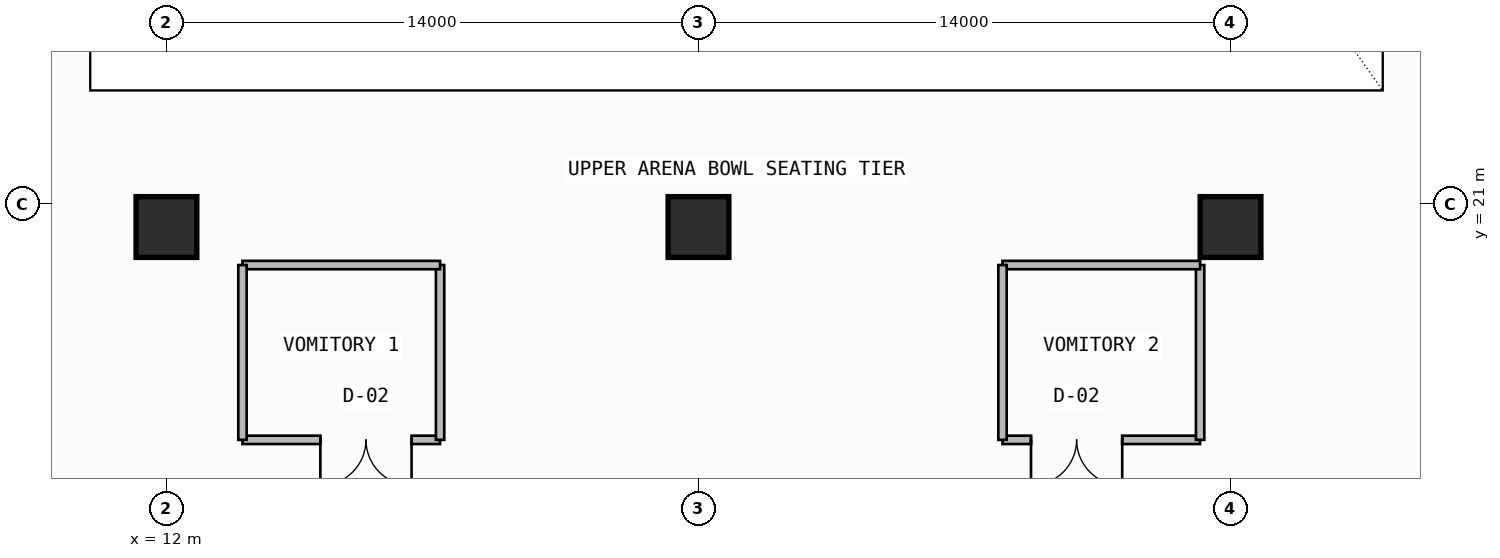
"""IFC4 building model, lengths in metres.
Left out: names, types, materials, properties, quantities, classifications, styles, units other than length and angle.
Written with IfcOpenShell. Run it as: python <this file> out.ifc"""

import sys

from ifc_helpers import new_model, si_unit, direction, frame, frame_2d, origin, origin_2d, place, context, subcontext, project, spatial, rectangle, extrude, element, fill, save


model = new_model("IFC4")
c1 = context("Model", 3, precision=1e-05, world=origin(), true_north=direction((0.0, 1.0)))
c2 = subcontext(c1, "Body", "Model", "MODEL_VIEW")
j1 = project(units=[si_unit("LENGTHUNIT", "METRE"), si_unit("PLANEANGLEUNIT", "RADIAN")], contexts=[c1])
p1 = place(None, origin())
s1 = spatial("IfcSite", under=j1, at=p1, CompositionType="ELEMENT")
p2 = place(p1, origin())
s2 = spatial("IfcBuilding", under=s1, at=p2, CompositionType="ELEMENT")
p3 = place(p2, frame((0.0, 0.0, 13.2)))
s3 = spatial("IfcBuildingStorey", under=s2, at=p3, CompositionType="ELEMENT", Elevation=13.2)
for number, where, z_axis, x_axis in (
    (1, (12.0, 20.4, 0.0), (0.0, 0.0, 1.0), (1.0, 0.0, 0.0)),
    (2, (26.0, 20.4, 0.0), (0.0, 0.0, 1.0), (1.0, 0.0, 0.0)),
    (3, (40.0, 20.4, 0.0), (0.0, 0.0, 1.0), (1.0, 0.0, 0.0)),
):
    element("IfcColumn", number, at=place(p3, frame(where, z_axis=z_axis, x_axis=x_axis)), inside=s3, PredefinedType="COLUMN", context=c2, shape_type="SweptSolid", body=[
        extrude(rectangle(XDim=1.6, YDim=1.6, at=origin_2d()), origin(), (0.0, 0.0, 1.0), 4.2),
    ])
p4 = place(p3, frame((14.0, 14.8, 0.0), z_axis=(0.0, 0.0, 1.0), x_axis=(1.0, 0.0, 0.0)))
e4 = element("IfcWall", 4, at=p4, inside=s3, PredefinedType="SOLIDWALL", context=c2, shape_type="SweptSolid", body=[
    extrude(rectangle(XDim=5.2, YDim=0.22, at=frame_2d((2.6, 0.0))), origin(), (0.0, 0.0, 1.0), 3.365),
])
p5 = place(p4, frame((2.05, 0.0, 0.0)))
e5 = element("IfcOpeningElement", 5, at=p5, cuts=e4, PredefinedType="OPENING", context=c2, shape_type="SweptSolid", body=[
    extrude(rectangle(XDim=2.4, YDim=2.4, at=frame_2d((1.2, 1.2))), frame((0.0, 0.12, 0.0), z_axis=(0.0, -1.0, 0.0), x_axis=(1.0, 0.0, 0.0)), (0.0, 0.0, 1.0), 0.24),
])
p6 = place(p3, frame((19.2, 14.8, 0.0), z_axis=(0.0, 0.0, 1.0), x_axis=(0.0, 1.0, 0.0)))
e6 = element("IfcWall", 6, at=p6, inside=s3, PredefinedType="SOLIDWALL", context=c2, shape_type="SweptSolid", body=[
    extrude(rectangle(XDim=4.6, YDim=0.22, at=frame_2d((2.3, 0.0))), origin(), (0.0, 0.0, 1.0), 3.365),
])
p7 = place(p3, frame((19.2, 19.4, 0.0), z_axis=(0.0, 0.0, 1.0), x_axis=(-1.0, 0.0, 0.0)))
e7 = element("IfcWall", 7, at=p7, inside=s3, PredefinedType="SOLIDWALL", context=c2, shape_type="SweptSolid", body=[
    extrude(rectangle(XDim=5.2, YDim=0.22, at=frame_2d((2.6, 0.0))), origin(), (0.0, 0.0, 1.0), 3.365),
])
p8 = place(p3, frame((14.0, 19.4, 0.0), z_axis=(0.0, 0.0, 1.0), x_axis=(0.0, -1.0, 0.0)))
e8 = element("IfcWall", 8, at=p8, inside=s3, PredefinedType="SOLIDWALL", context=c2, shape_type="SweptSolid", body=[
    extrude(rectangle(XDim=4.6, YDim=0.22, at=frame_2d((2.3, 0.0))), origin(), (0.0, 0.0, 1.0), 3.88),
])
p9 = place(p3, frame((34.0, 14.8, 0.0), z_axis=(0.0, 0.0, 1.0), x_axis=(1.0, 0.0, 0.0)))
e9 = element("IfcWall", 9, at=p9, inside=s3, PredefinedType="SOLIDWALL", context=c2, shape_type="SweptSolid", body=[
    extrude(rectangle(XDim=5.2, YDim=0.22, at=frame_2d((2.6, 0.0))), origin(), (0.0, 0.0, 1.0), 3.88),
])
p10 = place(p9, frame((0.75, 0.0, 0.0)))
e10 = element("IfcOpeningElement", 10, at=p10, cuts=e9, PredefinedType="OPENING", context=c2, shape_type="SweptSolid", body=[
    extrude(rectangle(XDim=2.4, YDim=2.4, at=frame_2d((1.2, 1.2))), frame((0.0, 0.12, 0.0), z_axis=(0.0, -1.0, 0.0), x_axis=(1.0, 0.0, 0.0)), (0.0, 0.0, 1.0), 0.24),
])
p11 = place(p3, frame((39.2, 14.8, 0.0), z_axis=(0.0, 0.0, 1.0), x_axis=(0.0, 1.0, 0.0)))
e11 = element("IfcWall", 11, at=p11, inside=s3, PredefinedType="SOLIDWALL", context=c2, shape_type="SweptSolid", body=[
    extrude(rectangle(XDim=4.6, YDim=0.22, at=frame_2d((2.3, 0.0))), origin(), (0.0, 0.0, 1.0), 3.88),
])
p12 = place(p3, frame((39.2, 19.4, 0.0), z_axis=(0.0, 0.0, 1.0), x_axis=(-1.0, 0.0, 0.0)))
e12 = element("IfcWall", 12, at=p12, inside=s3, PredefinedType="SOLIDWALL", context=c2, shape_type="SweptSolid", body=[
    extrude(rectangle(XDim=5.2, YDim=0.22, at=frame_2d((2.6, 0.0))), origin(), (0.0, 0.0, 1.0), 3.88),
])
p13 = place(p3, frame((34.0, 19.4, 0.0), z_axis=(0.0, 0.0, 1.0), x_axis=(0.0, -1.0, 0.0)))
e13 = element("IfcWall", 13, at=p13, inside=s3, PredefinedType="SOLIDWALL", context=c2, shape_type="SweptSolid", body=[
    extrude(rectangle(XDim=4.6, YDim=0.22, at=frame_2d((2.3, 0.0))), origin(), (0.0, 0.0, 1.0), 3.88),
])
p14 = place(p5, frame((2.4, 0.0, 0.0), z_axis=(0.0, 0.0, 1.0), x_axis=(-1.0, 0.0, 0.0)))
e14 = element("IfcDoor", 14, at=p14, inside=s3, OperationType="DOUBLE_DOOR_SINGLE_SWING", PredefinedType="USERDEFINED", context=c2, shape_type="SweptSolid", body=[
    extrude(rectangle(XDim=2.4, YDim=2.4, at=frame_2d((1.2, 1.2))), frame((0.0, 0.025, 0.0), z_axis=(0.0, -1.0, 0.0), x_axis=(1.0, 0.0, 0.0)), (0.0, 0.0, 1.0), 0.05),
])
fill(e5, e14)
p15 = place(p10, frame((2.4, 0.0, 0.0), z_axis=(0.0, 0.0, 1.0), x_axis=(-1.0, 0.0, 0.0)))
e15 = element("IfcDoor", 15, at=p15, inside=s3, OperationType="DOUBLE_DOOR_SINGLE_SWING", PredefinedType="USERDEFINED", context=c2, shape_type="SweptSolid", body=[
    extrude(rectangle(XDim=2.4, YDim=2.4, at=frame_2d((1.2, 1.2))), frame((0.0, 0.025, 0.0), z_axis=(0.0, -1.0, 0.0), x_axis=(1.0, 0.0, 0.0)), (0.0, 0.0, 1.0), 0.05),
])
fill(e10, e15)
save(model, sys.argv[1])
